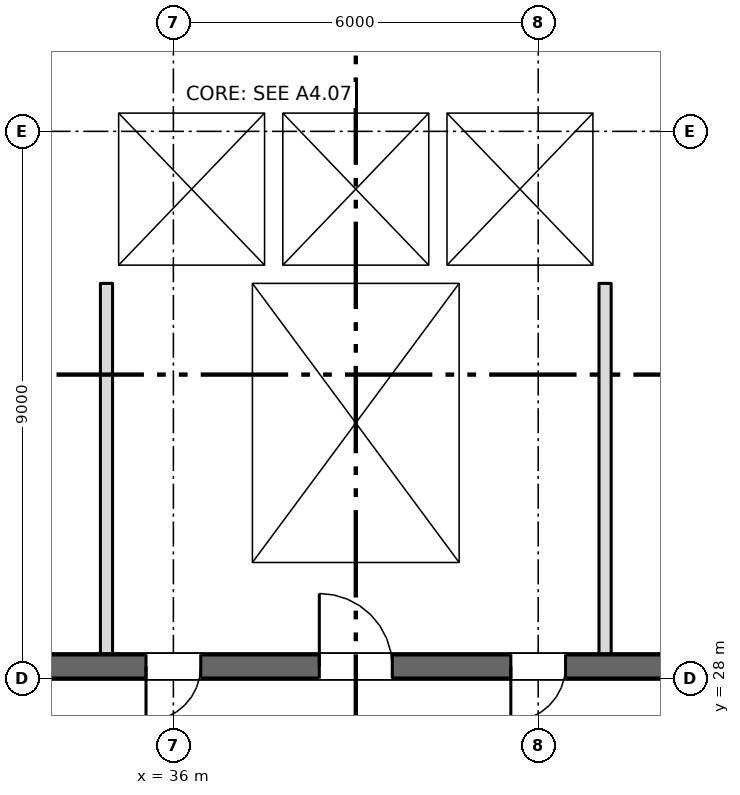
"""IFC4 building model, lengths in metres.
Left out: names, types, materials, properties, quantities, classifications, styles, units other than length and angle.
Written with IfcOpenShell. Run it as: python <this file> out.ifc"""

import sys

from ifc_helpers import new_model, si_unit, direction, frame, frame_2d, origin, place, context, subcontext, project, spatial, rectangle, extrude, element, fill, save


model = new_model("IFC4")
c1 = context("Model", 3, precision=1e-05, world=origin(), true_north=direction((0.0, 1.0)))
c2 = subcontext(c1, "Body", "Model", "MODEL_VIEW")
j1 = project(units=[si_unit("LENGTHUNIT", "METRE"), si_unit("PLANEANGLEUNIT", "RADIAN")], contexts=[c1])
p1 = place(None, origin())
s1 = spatial("IfcSite", under=j1, at=p1, CompositionType="ELEMENT")
p2 = place(p1, origin())
s2 = spatial("IfcBuilding", under=s1, at=p2, CompositionType="ELEMENT")
p3 = place(p2, frame((0.0, 0.0, 26.25)))
s3 = spatial("IfcBuildingStorey", under=s2, at=p3, CompositionType="ELEMENT", Elevation=26.25)
p4 = place(p3, frame((6.7, 28.2, 0.0), z_axis=(0.0, 0.0, 1.0), x_axis=(1.0, 0.0, 0.0)))
e1 = element("IfcWall", 1, at=p4, inside=s3, PredefinedType="SHEAR", context=c2, shape_type="SweptSolid", body=[
    extrude(rectangle(XDim=57.8, YDim=0.4, at=frame_2d((28.9, 0.0))), origin(), (0.0, 0.0, 1.0), 3.35),
])
p5 = place(p4, frame((12.562, 0.0, 0.0)))
e2 = element("IfcOpeningElement", 2, at=p5, cuts=e1, PredefinedType="OPENING", context=c2, shape_type="SweptSolid", body=[
    extrude(rectangle(XDim=0.9, YDim=2.1, at=frame_2d((0.45, 1.05))), frame((0.0, 0.21, 0.0), z_axis=(0.0, -1.0, 0.0), x_axis=(1.0, 0.0, 0.0)), (0.0, 0.0, 1.0), 0.42),
])
p6 = place(p4, frame((15.137, 0.0, 0.0)))
e3 = element("IfcOpeningElement", 3, at=p6, cuts=e1, PredefinedType="OPENING", context=c2, shape_type="SweptSolid", body=[
    extrude(rectangle(XDim=0.9, YDim=2.1, at=frame_2d((0.45, 1.05))), frame((0.0, 0.21, 0.0), z_axis=(0.0, -1.0, 0.0), x_axis=(1.0, 0.0, 0.0)), (0.0, 0.0, 1.0), 0.42),
])
p7 = place(p4, frame((49.85, 0.0, 0.0)))
e4 = element("IfcOpeningElement", 4, at=p7, cuts=e1, PredefinedType="OPENING", context=c2, shape_type="SweptSolid", body=[
    extrude(rectangle(XDim=0.9, YDim=2.1, at=frame_2d((0.45, 1.05))), frame((0.0, 0.21, 0.0), z_axis=(0.0, -1.0, 0.0), x_axis=(1.0, 0.0, 0.0)), (0.0, 0.0, 1.0), 0.42),
])
p8 = place(p4, frame((0.562, 0.0, 0.0)))
e5 = element("IfcOpeningElement", 5, at=p8, cuts=e1, PredefinedType="OPENING", context=c2, shape_type="SweptSolid", body=[
    extrude(rectangle(XDim=0.9, YDim=2.1, at=frame_2d((0.45, 1.05))), frame((0.0, 0.21, 0.0), z_axis=(0.0, -1.0, 0.0), x_axis=(1.0, 0.0, 0.0)), (0.0, 0.0, 1.0), 0.42),
])
p9 = place(p4, frame((2.137, 0.0, 0.0)))
e6 = element("IfcOpeningElement", 6, at=p9, cuts=e1, PredefinedType="OPENING", context=c2, shape_type="SweptSolid", body=[
    extrude(rectangle(XDim=0.9, YDim=2.1, at=frame_2d((0.45, 1.05))), frame((0.0, 0.21, 0.0), z_axis=(0.0, -1.0, 0.0), x_axis=(1.0, 0.0, 0.0)), (0.0, 0.0, 1.0), 0.42),
])
p10 = place(p4, frame((4.7, 0.0, 0.0)))
e7 = element("IfcOpeningElement", 7, at=p10, cuts=e1, PredefinedType="OPENING", context=c2, shape_type="SweptSolid", body=[
    extrude(rectangle(XDim=1.2, YDim=2.1, at=frame_2d((0.6, 1.05))), frame((0.0, 0.21, 0.0), z_axis=(0.0, -1.0, 0.0), x_axis=(1.0, 0.0, 0.0)), (0.0, 0.0, 1.0), 0.42),
])
p11 = place(p4, frame((31.7, 0.0, 0.0)))
e8 = element("IfcOpeningElement", 8, at=p11, cuts=e1, PredefinedType="OPENING", context=c2, shape_type="SweptSolid", body=[
    extrude(rectangle(XDim=1.2, YDim=2.1, at=frame_2d((0.6, 1.05))), frame((0.0, 0.21, 0.0), z_axis=(0.0, -1.0, 0.0), x_axis=(1.0, 0.0, 0.0)), (0.0, 0.0, 1.0), 0.42),
])
p12 = place(p4, frame((55.2, 0.0, 0.0)))
e9 = element("IfcOpeningElement", 9, at=p12, cuts=e1, PredefinedType="OPENING", context=c2, shape_type="SweptSolid", body=[
    extrude(rectangle(XDim=1.2, YDim=2.1, at=frame_2d((0.6, 1.05))), frame((0.0, 0.21, 0.0), z_axis=(0.0, -1.0, 0.0), x_axis=(1.0, 0.0, 0.0)), (0.0, 0.0, 1.0), 0.42),
])
p13 = place(p4, frame((21.7, 0.0, 0.0)))
e10 = element("IfcOpeningElement", 10, at=p13, cuts=e1, PredefinedType="OPENING", context=c2, shape_type="SweptSolid", body=[
    extrude(rectangle(XDim=1.2, YDim=2.1, at=frame_2d((0.6, 1.05))), frame((0.0, 0.21, 0.0), z_axis=(0.0, -1.0, 0.0), x_axis=(1.0, 0.0, 0.0)), (0.0, 0.0, 1.0), 0.42),
])
p14 = place(p4, frame((41.7, 0.0, 0.0)))
e11 = element("IfcOpeningElement", 11, at=p14, cuts=e1, PredefinedType="OPENING", context=c2, shape_type="SweptSolid", body=[
    extrude(rectangle(XDim=1.2, YDim=2.1, at=frame_2d((0.6, 1.05))), frame((0.0, 0.21, 0.0), z_axis=(0.0, -1.0, 0.0), x_axis=(1.0, 0.0, 0.0)), (0.0, 0.0, 1.0), 0.42),
])
p15 = place(p4, frame((24.85, 0.0, 0.0)))
e12 = element("IfcOpeningElement", 12, at=p15, cuts=e1, PredefinedType="OPENING", context=c2, shape_type="SweptSolid", body=[
    extrude(rectangle(XDim=2.4, YDim=2.1, at=frame_2d((1.2, 1.05))), frame((0.0, 0.21, 0.0), z_axis=(0.0, -1.0, 0.0), x_axis=(1.0, 0.0, 0.0)), (0.0, 0.0, 1.0), 0.42),
])
p16 = place(p4, frame((37.35, 0.0, 0.0)))
e13 = element("IfcOpeningElement", 13, at=p16, cuts=e1, PredefinedType="OPENING", context=c2, shape_type="SweptSolid", body=[
    extrude(rectangle(XDim=2.4, YDim=2.1, at=frame_2d((1.2, 1.05))), frame((0.0, 0.21, 0.0), z_axis=(0.0, -1.0, 0.0), x_axis=(1.0, 0.0, 0.0)), (0.0, 0.0, 1.0), 0.42),
])
p17 = place(p4, frame((7.85, 0.0, 0.0)))
e14 = element("IfcOpeningElement", 14, at=p17, cuts=e1, PredefinedType="OPENING", context=c2, shape_type="SweptSolid", body=[
    extrude(rectangle(XDim=2.4, YDim=2.1, at=frame_2d((1.2, 1.05))), frame((0.0, 0.21, 0.0), z_axis=(0.0, -1.0, 0.0), x_axis=(1.0, 0.0, 0.0)), (0.0, 0.0, 1.0), 0.42),
])
p18 = place(p4, frame((28.85, 0.0, 0.0)))
e15 = element("IfcOpeningElement", 15, at=p18, cuts=e1, PredefinedType="OPENING", context=c2, shape_type="SweptSolid", body=[
    extrude(rectangle(XDim=0.9, YDim=2.1, at=frame_2d((0.45, 1.05))), frame((0.0, 0.21, 0.0), z_axis=(0.0, -1.0, 0.0), x_axis=(1.0, 0.0, 0.0)), (0.0, 0.0, 1.0), 0.42),
])
p19 = place(p4, frame((34.85, 0.0, 0.0)))
e16 = element("IfcOpeningElement", 16, at=p19, cuts=e1, PredefinedType="OPENING", context=c2, shape_type="SweptSolid", body=[
    extrude(rectangle(XDim=0.9, YDim=2.1, at=frame_2d((0.45, 1.05))), frame((0.0, 0.21, 0.0), z_axis=(0.0, -1.0, 0.0), x_axis=(1.0, 0.0, 0.0)), (0.0, 0.0, 1.0), 0.42),
])
for number, where, z_axis, x_axis in (
    (17, (37.15, 28.4, 0.0), (0.0, 0.0, 1.0), (0.0, 1.0, 0.0)),
    (18, (40.85, 28.4, 0.0), (0.0, 0.0, 1.0), (0.0, 1.0, 0.0)),
):
    element("IfcWall", number, at=place(p3, frame(where, z_axis=z_axis, x_axis=x_axis)), inside=s3, PredefinedType="SHEAR", context=c2, shape_type="SweptSolid", body=[
        extrude(rectangle(XDim=6.1, YDim=0.3, at=frame_2d((3.05, 0.0))), origin(), (0.0, 0.0, 1.0), 3.35),
    ])
p20 = place(p3, frame((34.8, 34.65, 0.0), z_axis=(0.0, 0.0, 1.0), x_axis=(1.0, 0.0, 0.0)))
e19 = element("IfcWall", 19, at=p20, inside=s3, PredefinedType="SHEAR", context=c2, shape_type="SweptSolid", body=[
    extrude(rectangle(XDim=8.4, YDim=0.3, at=frame_2d((4.2, 0.0))), origin(), (0.0, 0.0, 1.0), 3.35),
])
p21 = place(p3, frame((34.8, 37.45, 0.0), z_axis=(0.0, 0.0, 1.0), x_axis=(1.0, 0.0, 0.0)))
e20 = element("IfcWall", 20, at=p21, inside=s3, PredefinedType="SHEAR", context=c2, shape_type="SweptSolid", body=[
    extrude(rectangle(XDim=8.4, YDim=0.3, at=frame_2d((4.2, 0.0))), origin(), (0.0, 0.0, 1.0), 3.35),
])
p22 = place(p21, frame((0.95, 0.0, 0.0)))
e21 = element("IfcOpeningElement", 21, at=p22, cuts=e20, PredefinedType="OPENING", context=c2, shape_type="SweptSolid", body=[
    extrude(rectangle(XDim=1.1, YDim=2.1, at=frame_2d((0.55, 1.05))), frame((0.0, 0.16, 0.0), z_axis=(0.0, -1.0, 0.0), x_axis=(1.0, 0.0, 0.0)), (0.0, 0.0, 1.0), 0.32),
])
p23 = place(p21, frame((3.65, 0.0, 0.0)))
e22 = element("IfcOpeningElement", 22, at=p23, cuts=e20, PredefinedType="OPENING", context=c2, shape_type="SweptSolid", body=[
    extrude(rectangle(XDim=1.1, YDim=2.1, at=frame_2d((0.55, 1.05))), frame((0.0, 0.16, 0.0), z_axis=(0.0, -1.0, 0.0), x_axis=(1.0, 0.0, 0.0)), (0.0, 0.0, 1.0), 0.32),
])
p24 = place(p21, frame((6.35, 0.0, 0.0)))
e23 = element("IfcOpeningElement", 23, at=p24, cuts=e20, PredefinedType="OPENING", context=c2, shape_type="SweptSolid", body=[
    extrude(rectangle(XDim=1.1, YDim=2.1, at=frame_2d((0.55, 1.05))), frame((0.0, 0.16, 0.0), z_axis=(0.0, -1.0, 0.0), x_axis=(1.0, 0.0, 0.0)), (0.0, 0.0, 1.0), 0.32),
])
for number, where, z_axis, x_axis in (
    (24, (34.95, 34.8, 0.0), (0.0, 0.0, 1.0), (0.0, 1.0, 0.0)),
    (25, (43.05, 34.8, 0.0), (0.0, 0.0, 1.0), (0.0, 1.0, 0.0)),
    (26, (37.65, 34.8, 0.0), (0.0, 0.0, 1.0), (0.0, 1.0, 0.0)),
    (27, (40.35, 34.8, 0.0), (0.0, 0.0, 1.0), (0.0, 1.0, 0.0)),
):
    element("IfcWall", number, at=place(p3, frame(where, z_axis=z_axis, x_axis=x_axis)), inside=s3, PredefinedType="SHEAR", context=c2, shape_type="SweptSolid", body=[
        extrude(rectangle(XDim=2.5, YDim=0.3, at=frame_2d((1.25, 0.0))), origin(), (0.0, 0.0, 1.0), 3.35),
    ])
for number, where, z_axis, x_axis in (
    (28, (34.9, 28.4, 0.0), (0.0, 0.0, 1.0), (0.0, 1.0, 0.0)),
    (29, (43.1, 28.4, 0.0), (0.0, 0.0, 1.0), (0.0, 1.0, 0.0)),
):
    element("IfcWall", number, at=place(p3, frame(where, z_axis=z_axis, x_axis=x_axis)), inside=s3, PredefinedType="PARTITIONING", context=c2, shape_type="SweptSolid", body=[
        extrude(rectangle(XDim=6.1, YDim=0.2, at=frame_2d((3.05, 0.0))), origin(), (0.0, 0.0, 1.0), 3.35),
    ])
p25 = place(p22, origin())
e30 = element("IfcDoor", 30, at=p25, inside=s3, OperationType="SLIDING_TO_LEFT", PredefinedType="DOOR", context=c2, shape_type="SweptSolid", body=[
    extrude(rectangle(XDim=1.1, YDim=2.1, at=frame_2d((0.55, 1.05))), frame((0.0, 0.025, 0.0), z_axis=(0.0, -1.0, 0.0), x_axis=(1.0, 0.0, 0.0)), (0.0, 0.0, 1.0), 0.05),
])
fill(e21, e30)
p26 = place(p23, origin())
e31 = element("IfcDoor", 31, at=p26, inside=s3, OperationType="SLIDING_TO_LEFT", PredefinedType="DOOR", context=c2, shape_type="SweptSolid", body=[
    extrude(rectangle(XDim=1.1, YDim=2.1, at=frame_2d((0.55, 1.05))), frame((0.0, 0.025, 0.0), z_axis=(0.0, -1.0, 0.0), x_axis=(1.0, 0.0, 0.0)), (0.0, 0.0, 1.0), 0.05),
])
fill(e22, e31)
p27 = place(p24, origin())
e32 = element("IfcDoor", 32, at=p27, inside=s3, OperationType="SLIDING_TO_LEFT", PredefinedType="DOOR", context=c2, shape_type="SweptSolid", body=[
    extrude(rectangle(XDim=1.1, YDim=2.1, at=frame_2d((0.55, 1.05))), frame((0.0, 0.025, 0.0), z_axis=(0.0, -1.0, 0.0), x_axis=(1.0, 0.0, 0.0)), (0.0, 0.0, 1.0), 0.05),
])
fill(e23, e32)
p28 = place(p11, origin())
e33 = element("IfcDoor", 33, at=p28, inside=s3, OperationType="SINGLE_SWING_LEFT", PredefinedType="DOOR", context=c2, shape_type="SweptSolid", body=[
    extrude(rectangle(XDim=1.2, YDim=2.1, at=frame_2d((0.6, 1.05))), frame((0.0, 0.025, 0.0), z_axis=(0.0, -1.0, 0.0), x_axis=(1.0, 0.0, 0.0)), (0.0, 0.0, 1.0), 0.05),
])
fill(e8, e33)
p29 = place(p18, origin())
e34 = element("IfcDoor", 34, at=p29, inside=s3, OperationType="SINGLE_SWING_LEFT", PredefinedType="DOOR", context=c2, shape_type="SweptSolid", body=[
    extrude(rectangle(XDim=0.9, YDim=2.1, at=frame_2d((0.45, 1.05))), frame((0.0, 0.025, 0.0), z_axis=(0.0, -1.0, 0.0), x_axis=(1.0, 0.0, 0.0)), (0.0, 0.0, 1.0), 0.05),
])
fill(e15, e34)
p30 = place(p19, origin())
e35 = element("IfcDoor", 35, at=p30, inside=s3, OperationType="SINGLE_SWING_LEFT", PredefinedType="DOOR", context=c2, shape_type="SweptSolid", body=[
    extrude(rectangle(XDim=0.9, YDim=2.1, at=frame_2d((0.45, 1.05))), frame((0.0, 0.025, 0.0), z_axis=(0.0, -1.0, 0.0), x_axis=(1.0, 0.0, 0.0)), (0.0, 0.0, 1.0), 0.05),
])
fill(e16, e35)
save(model, sys.argv[1])
